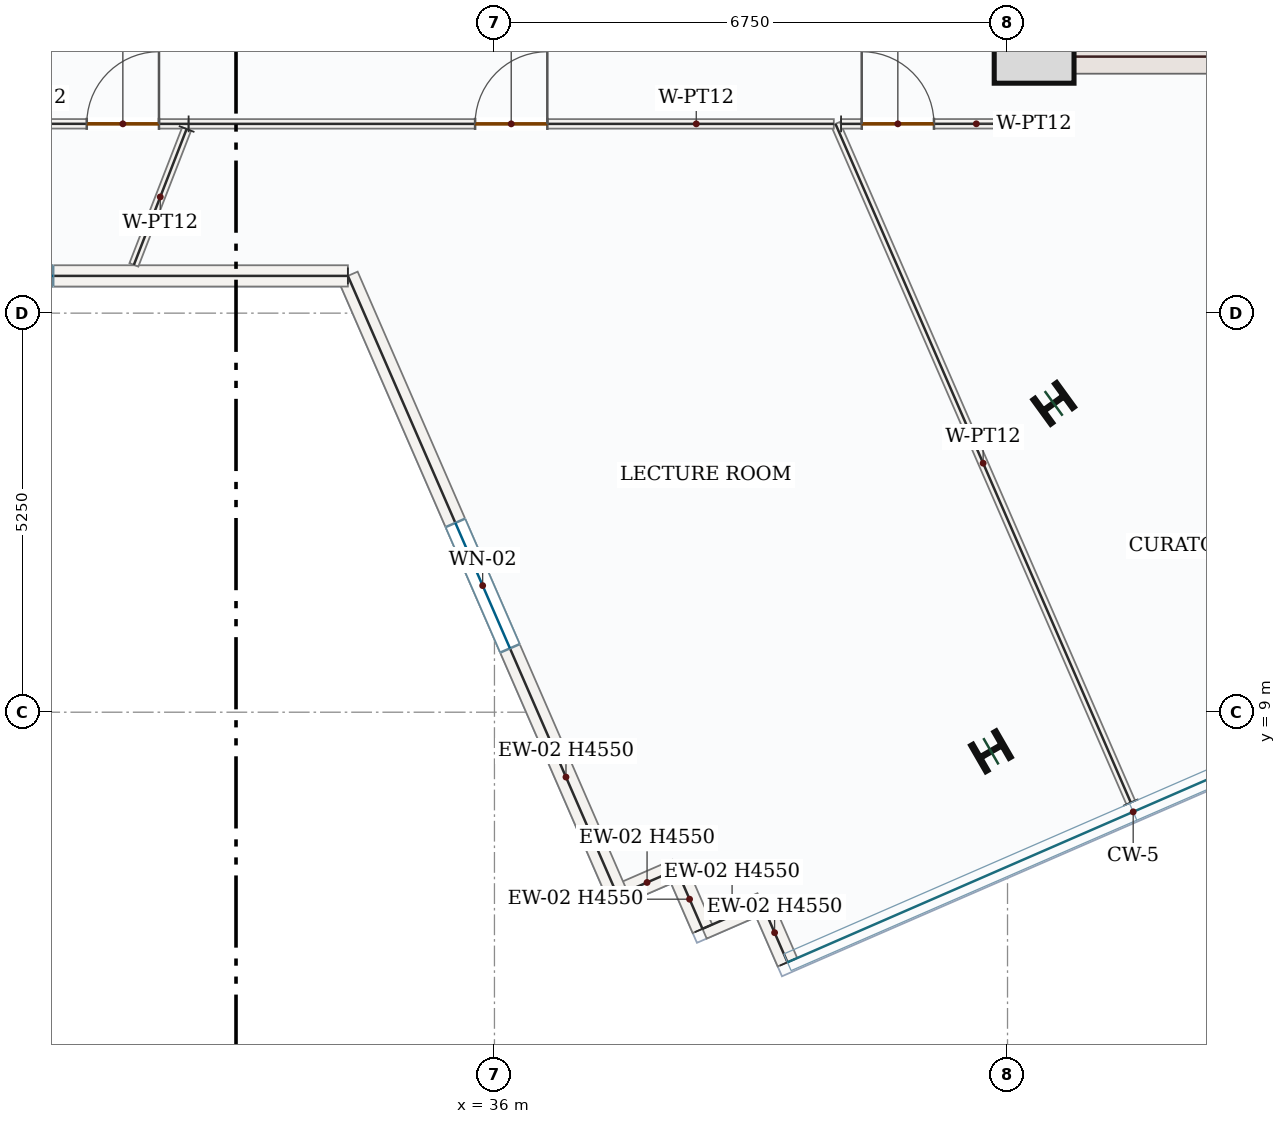
"""IFC4 building model, lengths in metres.
Left out: names, types, materials, properties, quantities, classifications, styles, units other than length and angle.
Written with IfcOpenShell. Run it as: python <this file> out.ifc"""

import sys

from ifc_helpers import new_model, si_unit, direction, frame, frame_2d, origin, origin_2d, place, context, subcontext, project, spatial, rectangle, i_section, extrude, source, transform, mapped, element, fill, save


model = new_model("IFC4")
c1 = context("Model", 3, precision=1e-05, world=origin(), true_north=direction((0.0, 1.0)))
c2 = subcontext(c1, "Body", "Model", "MODEL_VIEW")
j1 = project(units=[si_unit("LENGTHUNIT", "METRE"), si_unit("PLANEANGLEUNIT", "RADIAN")], contexts=[c1])
p1 = place(None, origin())
s1 = spatial("IfcSite", under=j1, at=p1, CompositionType="ELEMENT")
p2 = place(p1, origin())
s2 = spatial("IfcBuilding", under=s1, at=p2, CompositionType="ELEMENT")
p3 = place(p2, frame((0.0, 0.0, 234.3)))
s3 = spatial("IfcBuildingStorey", under=s2, at=p3, CompositionType="ELEMENT", Elevation=234.3)
p4 = place(p3, frame((42.975, 17.4, 0.0), z_axis=(0.0, 0.0, 1.0), x_axis=(0.0, 1.0, 0.0)))
e1 = element("IfcWall", 1, at=p4, inside=s3, PredefinedType="SHEAR", context=c2, shape_type="SweptSolid", body=[
    extrude(rectangle(XDim=8.55, YDim=0.45, at=frame_2d((4.275, 0.0))), origin(), (0.0, 0.0, 1.0), 4.55),
])
p5 = place(p4, frame((6.65, 0.0, 0.0)))
e2 = element("IfcOpeningElement", 2, at=p5, cuts=e1, PredefinedType="OPENING", context=c2, shape_type="SweptSolid", body=[
    extrude(rectangle(XDim=1.1, YDim=2.2, at=frame_2d((0.55, 1.1))), frame((0.0, 0.235, 0.0), z_axis=(0.0, -1.0, 0.0), x_axis=(1.0, 0.0, 0.0)), (0.0, 0.0, 1.0), 0.47),
])
p6 = place(p4, frame((1.75, 0.0, 0.0)))
e3 = element("IfcOpeningElement", 3, at=p6, cuts=e1, PredefinedType="OPENING", context=c2, shape_type="SweptSolid", body=[
    extrude(rectangle(XDim=1.3, YDim=2.2, at=frame_2d((0.65, 1.1))), frame((0.0, 0.235, 0.0), z_axis=(0.0, -1.0, 0.0), x_axis=(1.0, 0.0, 0.0)), (0.0, 0.0, 1.0), 0.47),
])
p7 = place(p4, frame((4.55, 0.0, 0.0)))
e4 = element("IfcOpeningElement", 4, at=p7, cuts=e1, PredefinedType="OPENING", context=c2, shape_type="SweptSolid", body=[
    extrude(rectangle(XDim=0.88, YDim=2.1, at=frame_2d((0.44, 1.05))), frame((0.0, 0.235, 0.0), z_axis=(0.0, -1.0, 0.0), x_axis=(1.0, 0.0, 0.0)), (0.0, 0.0, 1.0), 0.47),
])
m1 = source(origin(), c2, "Body", "SweptSolid", [
    extrude(rectangle(XDim=7.1, YDim=0.45, at=frame_2d((3.55, 0.0))), origin(), (0.0, 0.0, 1.0), 4.55),
])
p8 = place(p3, frame((43.2, 17.625, 0.0), z_axis=(0.0, 0.0, 1.0), x_axis=(1.0, 0.0, 0.0)))
e5 = element("IfcWall", 5, at=p8, inside=s3, PredefinedType="SHEAR", context=c2, shape_type="MappedRepresentation", body=[
    mapped(m1, transform((0.0, 0.0, 0.0), x_axis=(1.0, 0.0, 0.0), y_axis=(0.0, 1.0, 0.0), z_axis=(0.0, 0.0, 1.0), scale=1.0)),
])
m2 = source(origin(), c2, "Body", "SweptSolid", [
    extrude(rectangle(XDim=1.05, YDim=1.05, at=origin_2d()), origin(), (0.0, 0.0, 1.0), 4.8),
])
p9 = place(p3, frame((43.1, 17.8, 0.0), z_axis=(0.0, 0.0, 1.0), x_axis=(1.0, 0.0, 0.0)))
e6 = element("IfcColumn", 6, at=p9, inside=s3, PredefinedType="COLUMN", context=c2, shape_type="MappedRepresentation", body=[
    mapped(m2, transform((0.0, 0.0, 0.0), x_axis=(1.0, 0.0, 0.0), y_axis=(0.0, 1.0, 0.0), z_axis=(0.0, 0.0, 1.0), scale=1.0)),
])
m3 = source(origin(), c2, "Body", "SweptSolid", [
    extrude(i_section(OverallWidth=0.399, OverallDepth=0.386, WebThickness=0.021, FlangeThickness=0.033, FilletRadius=0.018, at=origin_2d()), origin(), (0.0, 0.0, 1.0), 4.8),
])
for number, where, z_axis, x_axis in (
    (7, (43.357, 13.063, 0.0), (0.0, 0.0, 1.0), (-0.588, 0.809, 0.0)),
    (8, (42.532, 8.486, 0.0), (0.0, 0.0, 1.0), (-0.5, 0.866, 0.0)),
):
    element("IfcColumn", number, at=place(p3, frame(where, z_axis=z_axis, x_axis=x_axis)), inside=s3, PredefinedType="COLUMN", context=c2, shape_type="MappedRepresentation", body=[
        mapped(m3, transform((0.0, 0.0, 0.0), x_axis=(1.0, 0.0, 0.0), y_axis=(0.0, 1.0, 0.0), z_axis=(0.0, 0.0, 1.0), scale=1.0)),
    ])
m4 = source(origin(), c2, "Body", "SweptSolid", [
    extrude(rectangle(XDim=0.85, YDim=0.28, at=frame_2d((0.425, 0.0))), origin(), (0.0, 0.0, 1.0), 4.55),
])
for number, where, z_axis, x_axis in (
    (9, (39.855, 5.71, 0.0), (0.0, 0.0, 1.0), (-0.399, 0.917, 0.0)),
    (10, (39.516, 6.49, 0.0), (0.0, 0.0, 1.0), (-0.917, -0.399, 0.0)),
    (11, (38.737, 6.15, 0.0), (0.0, 0.0, 1.0), (-0.399, 0.917, 0.0)),
):
    element("IfcWall", number, at=place(p3, frame(where, z_axis=z_axis, x_axis=x_axis)), inside=s3, PredefinedType="SOLIDWALL", context=c2, shape_type="MappedRepresentation", body=[
        mapped(m4, transform((0.0, 0.0, 0.0), x_axis=(1.0, 0.0, 0.0), y_axis=(0.0, 1.0, 0.0), z_axis=(0.0, 0.0, 1.0), scale=1.0)),
    ])
m5 = source(origin(), c2, "Body", "SweptSolid", [
    extrude(rectangle(XDim=0.85, YDim=0.28, at=frame_2d((0.425, 0.0))), origin(), (0.0, 0.0, 1.0), 4.55),
])
p10 = place(p3, frame((38.397, 6.93, 0.0), z_axis=(0.0, 0.0, 1.0), x_axis=(-0.916946703526, -0.399009702756, 0.0)))
e12 = element("IfcWall", 12, at=p10, inside=s3, PredefinedType="SOLIDWALL", context=c2, shape_type="MappedRepresentation", body=[
    mapped(m5, transform((0.0, 0.0, 0.0), x_axis=(1.0, 0.0, 0.0), y_axis=(0.0, 1.0, 0.0), z_axis=(0.0, 0.0, 1.0), scale=1.0)),
])
p11 = place(p3, frame((37.618, 6.591, 0.0), z_axis=(0.0, 0.0, 1.0), x_axis=(-0.399025418612, 0.916939864605, 0.0)))
e13 = element("IfcWall", 13, at=p11, inside=s3, PredefinedType="SOLIDWALL", context=c2, shape_type="SweptSolid", body=[
    extrude(rectangle(XDim=8.888, YDim=0.28, at=frame_2d((4.444, 0.0))), origin(), (0.0, 0.0, 1.0), 4.55),
])
p12 = place(p11, frame((3.544, 0.0, 0.85)))
e14 = element("IfcOpeningElement", 14, at=p12, cuts=e13, PredefinedType="OPENING", context=c2, shape_type="SweptSolid", body=[
    extrude(rectangle(XDim=1.8, YDim=1.75, at=frame_2d((0.9, 0.875))), frame((0.0, 0.15, 0.0), z_axis=(0.0, -1.0, 0.0), x_axis=(1.0, 0.0, 0.0)), (0.0, 0.0, 1.0), 0.3),
])
p13 = place(p3, frame((34.072, 14.74, 0.0), z_axis=(0.0, 0.0, 1.0), x_axis=(-1.0, 0.0, 0.0)))
e15 = element("IfcWall", 15, at=p13, inside=s3, PredefinedType="SOLIDWALL", context=c2, shape_type="SweptSolid", body=[
    extrude(rectangle(XDim=9.554, YDim=0.28, at=frame_2d((4.777, 0.0))), origin(), (0.0, 0.0, 1.0), 3.822),
])
p14 = place(p13, frame((3.877, 0.0, 0.85)))
e16 = element("IfcOpeningElement", 16, at=p14, cuts=e15, PredefinedType="OPENING", context=c2, shape_type="SweptSolid", body=[
    extrude(rectangle(XDim=1.8, YDim=1.75, at=frame_2d((0.9, 0.875))), frame((0.0, 0.15, 0.0), z_axis=(0.0, -1.0, 0.0), x_axis=(1.0, 0.0, 0.0)), (0.0, 0.0, 1.0), 0.3),
])
p15 = place(p3, frame((29.253, 16.741, 0.0), z_axis=(0.0, 0.0, 1.0), x_axis=(0.999999899509, -0.000448309827, 0.0)))
e17 = element("IfcWall", 17, at=p15, inside=s3, PredefinedType="PARTITIONING", context=c2, shape_type="SweptSolid", body=[
    extrude(rectangle(XDim=2.723, YDim=0.125, at=frame_2d((1.361, 0.0))), origin(), (0.0, 0.0, 1.0), 4.55),
])
p16 = place(p15, frame((1.383, 0.0, 0.0)))
e18 = element("IfcOpeningElement", 18, at=p16, cuts=e17, PredefinedType="OPENING", context=c2, shape_type="SweptSolid", body=[
    extrude(rectangle(XDim=0.95, YDim=2.15, at=frame_2d((0.475, 1.075))), frame((0.0, 0.073, 0.0), z_axis=(0.0, -1.0, 0.0), x_axis=(1.0, 0.0, 0.0)), (0.0, 0.0, 1.0), 0.145),
])
m6 = source(origin(), c2, "Body", "SweptSolid", [
    extrude(rectangle(XDim=1.917, YDim=0.125, at=frame_2d((0.959, 0.0))), origin(), (0.0, 0.0, 1.0), 4.55),
])
p17 = place(p3, frame((31.95, 16.673, 0.0), z_axis=(0.0, 0.0, 1.0), x_axis=(-0.361844059872, -0.932238637011, 0.0)))
e19 = element("IfcWall", 19, at=p17, inside=s3, PredefinedType="PARTITIONING", context=c2, shape_type="MappedRepresentation", body=[
    mapped(m6, transform((0.0, 0.0, 0.0), x_axis=(1.0, 0.0, 0.0), y_axis=(0.0, 1.0, 0.0), z_axis=(0.0, 0.0, 1.0), scale=1.0)),
])
m7 = source(origin(), c2, "Body", "SweptSolid", [
    extrude(rectangle(XDim=9.737, YDim=0.125, at=frame_2d((4.869, 0.0))), origin(), (0.0, 0.0, 1.0), 4.55),
])
p18 = place(p3, frame((44.372, 7.812, 0.0), z_axis=(0.0, 0.0, 1.0), x_axis=(-0.399021313491, 0.916941651022, 0.0)))
e20 = element("IfcWall", 20, at=p18, inside=s3, PredefinedType="PARTITIONING", context=c2, shape_type="MappedRepresentation", body=[
    mapped(m7, transform((0.0, 0.0, 0.0), x_axis=(1.0, 0.0, 0.0), y_axis=(0.0, 1.0, 0.0), z_axis=(0.0, 0.0, 1.0), scale=1.0)),
])
p19 = place(p3, frame((40.56, 16.74, 0.0), z_axis=(0.0, 0.0, 1.0), x_axis=(0.999999844124, 0.000558347205, 0.0)))
e21 = element("IfcWall", 21, at=p19, inside=s3, PredefinedType="PARTITIONING", context=c2, shape_type="SweptSolid", body=[
    extrude(rectangle(XDim=2.186, YDim=0.125, at=frame_2d((1.093, 0.0))), origin(), (0.0, 0.0, 1.0), 4.55),
])
p20 = place(p19, frame((0.272, 0.0, 0.0)))
e22 = element("IfcOpeningElement", 22, at=p20, cuts=e21, PredefinedType="OPENING", context=c2, shape_type="SweptSolid", body=[
    extrude(rectangle(XDim=0.95, YDim=2.15, at=frame_2d((0.475, 1.075))), frame((0.0, 0.073, 0.0), z_axis=(0.0, -1.0, 0.0), x_axis=(1.0, 0.0, 0.0)), (0.0, 0.0, 1.0), 0.145),
])
p21 = place(p3, frame((31.976, 16.74, 0.0), z_axis=(0.0, 0.0, 1.0), x_axis=(1.0, 0.0, 0.0)))
e23 = element("IfcWall", 23, at=p21, inside=s3, PredefinedType="PARTITIONING", context=c2, shape_type="SweptSolid", body=[
    extrude(rectangle(XDim=8.488, YDim=0.125, at=frame_2d((4.244, 0.0))), origin(), (0.0, 0.0, 1.0), 4.55),
])
p22 = place(p21, frame((3.769, 0.0, 0.0)))
e24 = element("IfcOpeningElement", 24, at=p22, cuts=e23, PredefinedType="OPENING", context=c2, shape_type="SweptSolid", body=[
    extrude(rectangle(XDim=0.95, YDim=2.15, at=frame_2d((0.475, 1.075))), frame((0.0, 0.073, 0.0), z_axis=(0.0, -1.0, 0.0), x_axis=(1.0, 0.0, 0.0)), (0.0, 0.0, 1.0), 0.145),
])
m8 = source(origin(), c2, "Body", "SweptSolid", [
    extrude(rectangle(XDim=1.8, YDim=1.75, at=frame_2d((0.9, 0.875))), frame((0.0, 0.03, 0.0), z_axis=(0.0, -1.0, 0.0), x_axis=(1.0, 0.0, 0.0)), (0.0, 0.0, 1.0), 0.06),
])
p23 = place(p12, origin())
e25 = element("IfcWindow", 25, at=p23, inside=s3, PartitioningType="DOUBLE_PANEL_VERTICAL", PredefinedType="WINDOW", context=c2, shape_type="MappedRepresentation", body=[
    mapped(m8, transform((0.0, 0.0, 0.0), x_axis=(1.0, 0.0, 0.0), y_axis=(0.0, 1.0, 0.0), z_axis=(0.0, 0.0, 1.0), scale=1.0)),
])
fill(e14, e25)
p24 = place(p14, origin())
e26 = element("IfcWindow", 26, at=p24, inside=s3, PartitioningType="DOUBLE_PANEL_VERTICAL", PredefinedType="WINDOW", context=c2, shape_type="MappedRepresentation", body=[
    mapped(m8, transform((0.0, 0.0, 0.0), x_axis=(1.0, 0.0, 0.0), y_axis=(0.0, 1.0, 0.0), z_axis=(0.0, 0.0, 1.0), scale=1.0)),
])
fill(e16, e26)
m9 = source(origin(), c2, "Body", "SweptSolid", [
    extrude(rectangle(XDim=0.95, YDim=2.15, at=frame_2d((0.475, 1.075))), frame((0.0, 0.025, 0.0), z_axis=(0.0, -1.0, 0.0), x_axis=(1.0, 0.0, 0.0)), (0.0, 0.0, 1.0), 0.05),
])
p25 = place(p16, origin())
e27 = element("IfcDoor", 27, at=p25, inside=s3, OperationType="SINGLE_SWING_RIGHT", PredefinedType="DOOR", context=c2, shape_type="MappedRepresentation", body=[
    mapped(m9, transform((0.0, 0.0, 0.0), x_axis=(1.0, 0.0, 0.0), y_axis=(0.0, 1.0, 0.0), z_axis=(0.0, 0.0, 1.0), scale=1.0)),
])
fill(e18, e27)
p26 = place(p22, origin())
e28 = element("IfcDoor", 28, at=p26, inside=s3, OperationType="SINGLE_SWING_RIGHT", PredefinedType="DOOR", context=c2, shape_type="MappedRepresentation", body=[
    mapped(m9, transform((0.0, 0.0, 0.0), x_axis=(1.0, 0.0, 0.0), y_axis=(0.0, 1.0, 0.0), z_axis=(0.0, 0.0, 1.0), scale=1.0)),
])
fill(e24, e28)
p27 = place(p20, origin())
e29 = element("IfcDoor", 29, at=p27, inside=s3, OperationType="SINGLE_SWING_LEFT", PredefinedType="DOOR", context=c2, shape_type="MappedRepresentation", body=[
    mapped(m9, transform((0.0, 0.0, 0.0), x_axis=(1.0, 0.0, 0.0), y_axis=(0.0, 1.0, 0.0), z_axis=(0.0, 0.0, 1.0), scale=1.0)),
])
fill(e22, e29)
save(model, sys.argv[1])
